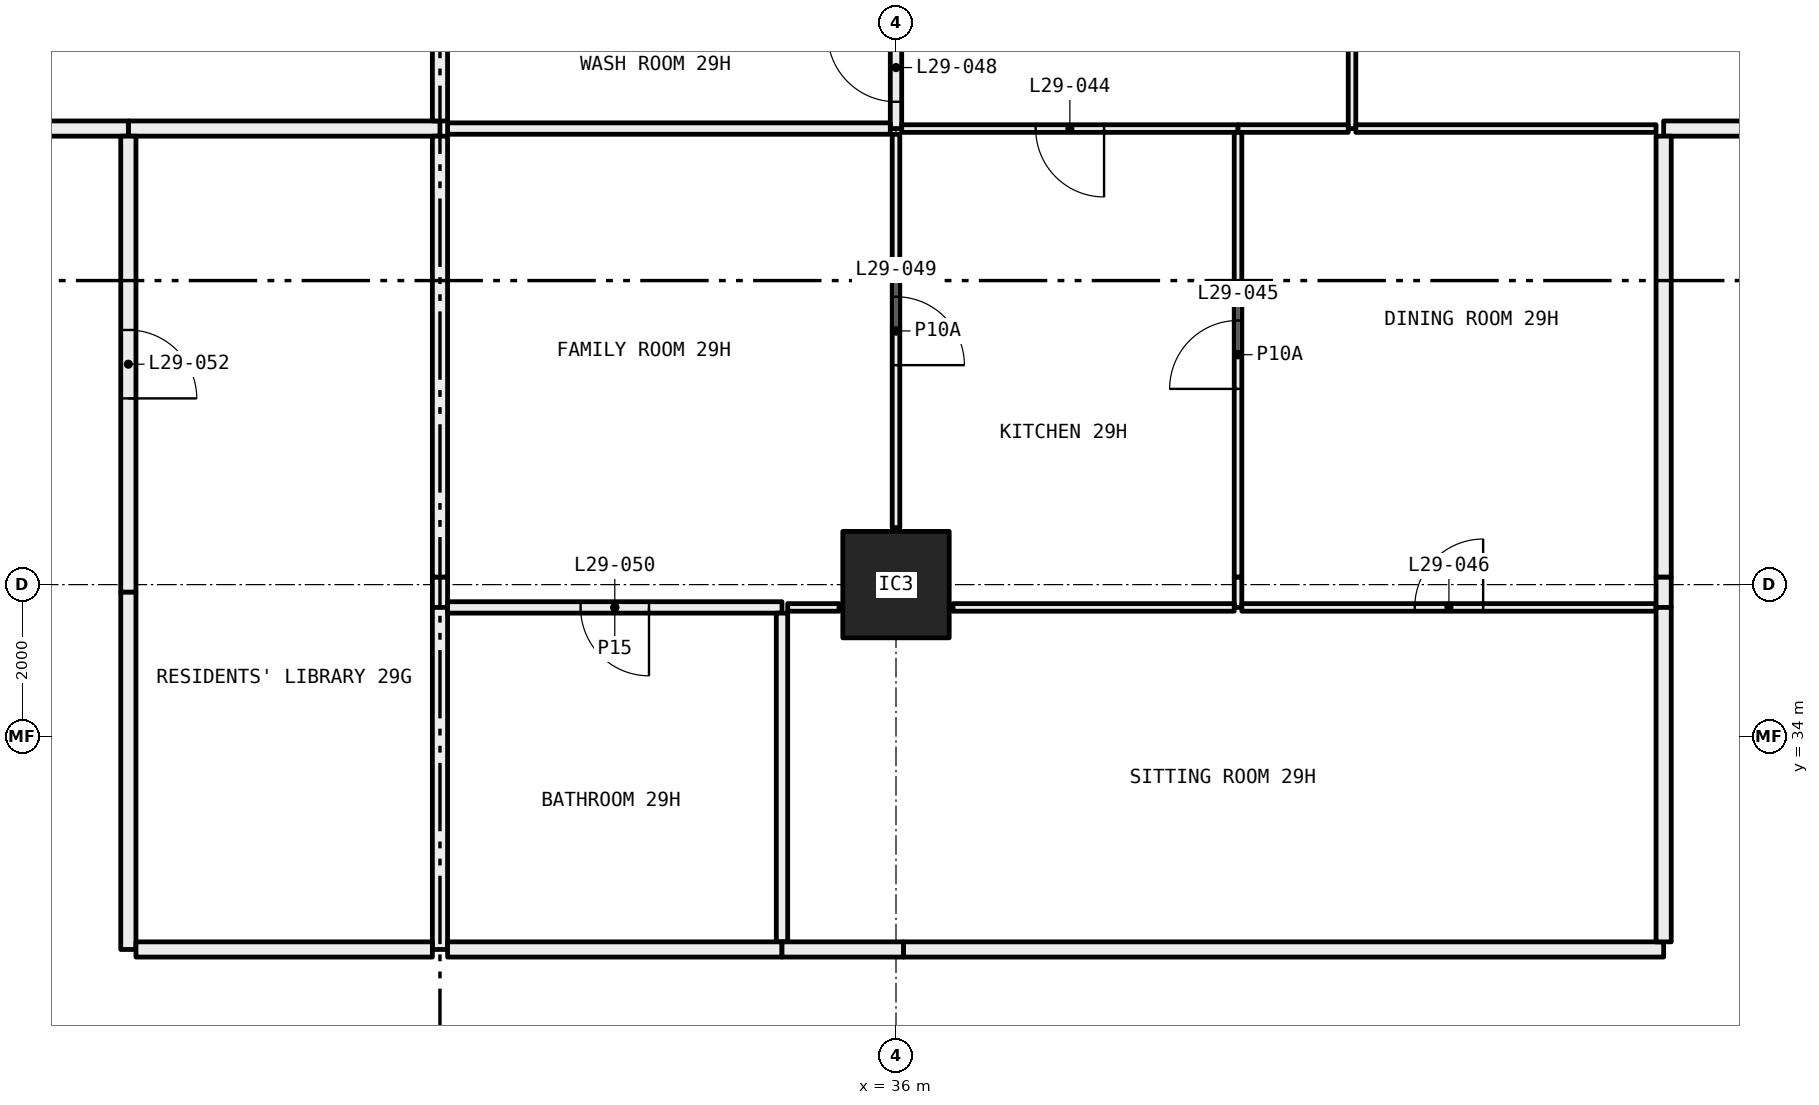
"""IFC4 building model, lengths in metres.
Left out: names, types, materials, properties, quantities, classifications, styles, units other than length and angle.
Written with IfcOpenShell. Run it as: python <this file> out.ifc"""

import sys

from ifc_helpers import new_model, si_unit, direction, frame, frame_2d, origin, origin_2d, place, context, subcontext, project, spatial, rectangle, hollow_rectangle, extrude, element, fill, save


model = new_model("IFC4")
c1 = context("Model", 3, precision=1e-05, world=origin(), true_north=direction((0.0, 1.0)))
c2 = subcontext(c1, "Body", "Model", "MODEL_VIEW")
j1 = project(units=[si_unit("LENGTHUNIT", "METRE"), si_unit("PLANEANGLEUNIT", "RADIAN")], contexts=[c1])
p1 = place(None, origin())
s1 = spatial("IfcSite", under=j1, at=p1, CompositionType="ELEMENT")
p2 = place(p1, origin())
s2 = spatial("IfcBuilding", under=s1, at=p2, CompositionType="ELEMENT")
p3 = place(p2, frame((0.0, 0.0, 113.85)))
s3 = spatial("IfcBuildingStorey", under=s2, at=p3, CompositionType="ELEMENT", Elevation=113.85)
p4 = place(p3, frame((36.0, 36.0, 0.0), z_axis=(0.0, 0.0, 1.0), x_axis=(1.0, 0.0, 0.0)))
e1 = element("IfcColumn", 1, at=p4, inside=s3, PredefinedType="COLUMN", context=c2, shape_type="SweptSolid", body=[
    extrude(hollow_rectangle(XDim=1.4, YDim=1.4, WallThickness=0.06, at=origin_2d()), origin(), (0.0, 0.0, 1.0), 3.05),
])
p5 = place(p3, frame((25.9, 42.0, 0.0), z_axis=(0.0, 0.0, 1.0), x_axis=(1.0, 0.0, 0.0)))
e2 = element("IfcWall", 2, at=p5, inside=s3, PredefinedType="PARTITIONING", context=c2, shape_type="SweptSolid", body=[
    extrude(rectangle(XDim=4.1, YDim=0.2, at=frame_2d((2.05, 0.0))), origin(), (0.0, 0.0, 1.0), 3.05),
])
p6 = place(p3, frame((30.0, 42.1, 0.0), z_axis=(0.0, 0.0, 1.0), x_axis=(0.0, 1.0, 0.0)))
e3 = element("IfcWall", 3, at=p6, inside=s3, PredefinedType="PARTITIONING", context=c2, shape_type="SweptSolid", body=[
    extrude(rectangle(XDim=1.58, YDim=0.2, at=frame_2d((0.79, 0.0))), origin(), (0.0, 0.0, 1.0), 3.05),
])
p7 = place(p3, frame((24.0, 42.0, 0.0), z_axis=(0.0, 0.0, 1.0), x_axis=(1.0, 0.0, 0.0)))
e4 = element("IfcWall", 4, at=p7, inside=s3, PredefinedType="PARTITIONING", context=c2, shape_type="SweptSolid", body=[
    extrude(rectangle(XDim=1.9, YDim=0.2, at=frame_2d((0.95, 0.0))), origin(), (0.0, 0.0, 1.0), 3.05),
])
p8 = place(p3, frame((30.0, 35.7, 0.0), z_axis=(0.0, 0.0, 1.0), x_axis=(0.0, 1.0, 0.0)))
e5 = element("IfcWall", 5, at=p8, inside=s3, PredefinedType="PARTITIONING", context=c2, shape_type="SweptSolid", body=[
    extrude(rectangle(XDim=0.4, YDim=0.2, at=frame_2d((0.2, 0.0))), origin(), (0.0, 0.0, 1.0), 2.45),
])
p9 = place(p3, frame((30.0, 36.1, 0.0), z_axis=(0.0, 0.0, 1.0), x_axis=(0.0, 1.0, 0.0)))
e6 = element("IfcWall", 6, at=p9, inside=s3, PredefinedType="PARTITIONING", context=c2, shape_type="SweptSolid", body=[
    extrude(rectangle(XDim=5.8, YDim=0.2, at=frame_2d((2.9, 0.0))), origin(), (0.0, 0.0, 1.0), 3.05),
])
p10 = place(p3, frame((30.0, 31.2, 0.0), z_axis=(0.0, 0.0, 1.0), x_axis=(0.0, 1.0, 0.0)))
e7 = element("IfcWall", 7, at=p10, inside=s3, PredefinedType="PARTITIONING", context=c2, shape_type="SweptSolid", body=[
    extrude(rectangle(XDim=4.5, YDim=0.2, at=frame_2d((2.25, 0.0))), origin(), (0.0, 0.0, 1.0), 3.05),
])
p11 = place(p3, frame((25.9, 41.9, 0.0), z_axis=(0.0, 0.0, 1.0), x_axis=(0.0, -1.0, 0.0)))
e8 = element("IfcWall", 8, at=p11, inside=s3, PredefinedType="PARTITIONING", context=c2, shape_type="SweptSolid", body=[
    extrude(rectangle(XDim=6.0, YDim=0.2, at=frame_2d((3.0, 0.0))), origin(), (0.0, 0.0, 1.0), 2.45),
])
p12 = place(p11, frame((2.55, 0.0, 0.0)))
e9 = element("IfcOpeningElement", 9, at=p12, cuts=e8, PredefinedType="OPENING", context=c2, shape_type="SweptSolid", body=[
    extrude(rectangle(XDim=0.9, YDim=2.1, at=frame_2d((0.45, 1.05))), frame((0.0, 0.11, 0.0), z_axis=(0.0, -1.0, 0.0), x_axis=(1.0, 0.0, 0.0)), (0.0, 0.0, 1.0), 0.22),
])
p13 = place(p3, frame((25.9, 35.9, 0.0), z_axis=(0.0, 0.0, 1.0), x_axis=(0.0, -1.0, 0.0)))
e10 = element("IfcWall", 10, at=p13, inside=s3, PredefinedType="PARTITIONING", context=c2, shape_type="SweptSolid", body=[
    extrude(rectangle(XDim=4.7, YDim=0.2, at=frame_2d((2.35, 0.0))), origin(), (0.0, 0.0, 1.0), 3.05),
])
p14 = place(p3, frame((26.0, 31.2, 0.0), z_axis=(0.0, 0.0, 1.0), x_axis=(1.0, 0.0, 0.0)))
e11 = element("IfcWall", 11, at=p14, inside=s3, PredefinedType="PARTITIONING", context=c2, shape_type="SweptSolid", body=[
    extrude(rectangle(XDim=3.9, YDim=0.2, at=frame_2d((1.95, 0.0))), origin(), (0.0, 0.0, 1.0), 3.05),
])
p15 = place(p3, frame((36.0, 42.0, 0.0), z_axis=(0.0, 0.0, 1.0), x_axis=(0.0, 1.0, 0.0)))
e12 = element("IfcWall", 12, at=p15, inside=s3, PredefinedType="PARTITIONING", context=c2, shape_type="SweptSolid", body=[
    extrude(rectangle(XDim=1.605, YDim=0.15, at=frame_2d((0.802, 0.0))), origin(), (0.0, 0.0, 1.0), 2.45),
])
p16 = place(p15, frame((0.353, 0.0, 0.0)))
e13 = element("IfcOpeningElement", 13, at=p16, cuts=e12, PredefinedType="OPENING", context=c2, shape_type="SweptSolid", body=[
    extrude(rectangle(XDim=0.9, YDim=2.1, at=frame_2d((0.45, 1.05))), frame((0.0, 0.085, 0.0), z_axis=(0.0, -1.0, 0.0), x_axis=(1.0, 0.0, 0.0)), (0.0, 0.0, 1.0), 0.17),
])
p17 = place(p3, frame((30.1, 42.0, 0.0), z_axis=(0.0, 0.0, 1.0), x_axis=(1.0, 0.0, 0.0)))
e14 = element("IfcWall", 14, at=p17, inside=s3, PredefinedType="PARTITIONING", context=c2, shape_type="SweptSolid", body=[
    extrude(rectangle(XDim=5.825, YDim=0.15, at=frame_2d((2.913, 0.0))), origin(), (0.0, 0.0, 1.0), 2.45),
])
p18 = place(p3, frame((42.0, 42.0, 0.0), z_axis=(0.0, 0.0, 1.0), x_axis=(0.0, 1.0, 0.0)))
e15 = element("IfcWall", 15, at=p18, inside=s3, PredefinedType="PARTITIONING", context=c2, shape_type="SweptSolid", body=[
    extrude(rectangle(XDim=5.28, YDim=0.1, at=frame_2d((2.64, 0.0))), origin(), (0.0, 0.0, 1.0), 3.05),
])
p19 = place(p18, frame((2.19, 0.0, 0.0)))
e16 = element("IfcOpeningElement", 16, at=p19, cuts=e15, PredefinedType="OPENING", context=c2, shape_type="SweptSolid", body=[
    extrude(rectangle(XDim=0.9, YDim=2.1, at=frame_2d((0.45, 1.05))), frame((0.0, 0.06, 0.0), z_axis=(0.0, -1.0, 0.0), x_axis=(1.0, 0.0, 0.0)), (0.0, 0.0, 1.0), 0.12),
])
p20 = place(p3, frame((36.075, 42.0, 0.0), z_axis=(0.0, 0.0, 1.0), x_axis=(1.0, 0.0, 0.0)))
e17 = element("IfcWall", 17, at=p20, inside=s3, PredefinedType="PARTITIONING", context=c2, shape_type="SweptSolid", body=[
    extrude(rectangle(XDim=4.425, YDim=0.1, at=frame_2d((2.212, 0.0))), origin(), (0.0, 0.0, 1.0), 2.45),
])
p21 = place(p20, frame((1.762, 0.0, 0.0)))
e18 = element("IfcOpeningElement", 18, at=p21, cuts=e17, PredefinedType="OPENING", context=c2, shape_type="SweptSolid", body=[
    extrude(rectangle(XDim=0.9, YDim=2.1, at=frame_2d((0.45, 1.05))), frame((0.0, 0.06, 0.0), z_axis=(0.0, -1.0, 0.0), x_axis=(1.0, 0.0, 0.0)), (0.0, 0.0, 1.0), 0.12),
])
p22 = place(p3, frame((40.5, 42.0, 0.0), z_axis=(0.0, 0.0, 1.0), x_axis=(1.0, 0.0, 0.0)))
e19 = element("IfcWall", 19, at=p22, inside=s3, PredefinedType="PARTITIONING", context=c2, shape_type="SweptSolid", body=[
    extrude(rectangle(XDim=1.45, YDim=0.1, at=frame_2d((0.725, 0.0))), origin(), (0.0, 0.0, 1.0), 3.05),
])
p23 = place(p3, frame((42.05, 42.0, 0.0), z_axis=(0.0, 0.0, 1.0), x_axis=(1.0, 0.0, 0.0)))
e20 = element("IfcWall", 20, at=p23, inside=s3, PredefinedType="PARTITIONING", context=c2, shape_type="SweptSolid", body=[
    extrude(rectangle(XDim=3.95, YDim=0.1, at=frame_2d((1.975, 0.0))), origin(), (0.0, 0.0, 1.0), 3.05),
])
p24 = place(p3, frame((46.1, 42.0, 0.0), z_axis=(0.0, 0.0, 1.0), x_axis=(1.0, 0.0, 0.0)))
e21 = element("IfcWall", 21, at=p24, inside=s3, PredefinedType="PARTITIONING", context=c2, shape_type="SweptSolid", body=[
    extrude(rectangle(XDim=1.9, YDim=0.2, at=frame_2d((0.95, 0.0))), origin(), (0.0, 0.0, 1.0), 3.05),
])
p25 = place(p3, frame((36.0, 36.75, 0.0), z_axis=(0.0, 0.0, 1.0), x_axis=(0.0, 1.0, 0.0)))
e22 = element("IfcWall", 22, at=p25, inside=s3, PredefinedType="PARTITIONING", context=c2, shape_type="SweptSolid", body=[
    extrude(rectangle(XDim=5.175, YDim=0.1, at=frame_2d((2.587, 0.0))), origin(), (0.0, 0.0, 1.0), 2.45),
])
p26 = place(p25, frame((2.137, 0.0, 0.0)))
e23 = element("IfcOpeningElement", 23, at=p26, cuts=e22, PredefinedType="OPENING", context=c2, shape_type="SweptSolid", body=[
    extrude(rectangle(XDim=0.9, YDim=2.1, at=frame_2d((0.45, 1.05))), frame((0.0, 0.06, 0.0), z_axis=(0.0, -1.0, 0.0), x_axis=(1.0, 0.0, 0.0)), (0.0, 0.0, 1.0), 0.12),
])
p27 = place(p3, frame((30.1, 35.7, 0.0), z_axis=(0.0, 0.0, 1.0), x_axis=(1.0, 0.0, 0.0)))
e24 = element("IfcWall", 24, at=p27, inside=s3, PredefinedType="PARTITIONING", context=c2, shape_type="SweptSolid", body=[
    extrude(rectangle(XDim=4.4, YDim=0.15, at=frame_2d((2.2, 0.0))), origin(), (0.0, 0.0, 1.0), 3.05),
])
p28 = place(p27, frame((1.75, 0.0, 0.0)))
e25 = element("IfcOpeningElement", 25, at=p28, cuts=e24, PredefinedType="OPENING", context=c2, shape_type="SweptSolid", body=[
    extrude(rectangle(XDim=0.9, YDim=2.1, at=frame_2d((0.45, 1.05))), frame((0.0, 0.085, 0.0), z_axis=(0.0, -1.0, 0.0), x_axis=(1.0, 0.0, 0.0)), (0.0, 0.0, 1.0), 0.17),
])
p29 = place(p3, frame((34.575, 35.7, 0.0), z_axis=(0.0, 0.0, 1.0), x_axis=(1.0, 0.0, 0.0)))
e26 = element("IfcWall", 26, at=p29, inside=s3, PredefinedType="PARTITIONING", context=c2, shape_type="SweptSolid", body=[
    extrude(rectangle(XDim=0.675, YDim=0.1, at=frame_2d((0.337, 0.0))), origin(), (0.0, 0.0, 1.0), 3.05),
])
p30 = place(p3, frame((40.5, 35.7, 0.0), z_axis=(0.0, 0.0, 1.0), x_axis=(0.0, 1.0, 0.0)))
e27 = element("IfcWall", 27, at=p30, inside=s3, PredefinedType="PARTITIONING", context=c2, shape_type="SweptSolid", body=[
    extrude(rectangle(XDim=0.4, YDim=0.1, at=frame_2d((0.2, 0.0))), origin(), (0.0, 0.0, 1.0), 2.45),
])
p31 = place(p3, frame((40.5, 36.1, 0.0), z_axis=(0.0, 0.0, 1.0), x_axis=(0.0, 1.0, 0.0)))
e28 = element("IfcWall", 28, at=p31, inside=s3, PredefinedType="PARTITIONING", context=c2, shape_type="SweptSolid", body=[
    extrude(rectangle(XDim=5.85, YDim=0.1, at=frame_2d((2.925, 0.0))), origin(), (0.0, 0.0, 1.0), 3.05),
])
p32 = place(p31, frame((2.475, 0.0, 0.0)))
e29 = element("IfcOpeningElement", 29, at=p32, cuts=e28, PredefinedType="OPENING", context=c2, shape_type="SweptSolid", body=[
    extrude(rectangle(XDim=0.9, YDim=2.1, at=frame_2d((0.45, 1.05))), frame((0.0, 0.06, 0.0), z_axis=(0.0, -1.0, 0.0), x_axis=(1.0, 0.0, 0.0)), (0.0, 0.0, 1.0), 0.12),
])
p33 = place(p3, frame((36.75, 35.7, 0.0), z_axis=(0.0, 0.0, 1.0), x_axis=(1.0, 0.0, 0.0)))
e30 = element("IfcWall", 30, at=p33, inside=s3, PredefinedType="PARTITIONING", context=c2, shape_type="SweptSolid", body=[
    extrude(rectangle(XDim=3.7, YDim=0.1, at=frame_2d((1.85, 0.0))), origin(), (0.0, 0.0, 1.0), 3.05),
])
p34 = place(p3, frame((40.55, 35.7, 0.0), z_axis=(0.0, 0.0, 1.0), x_axis=(1.0, 0.0, 0.0)))
e31 = element("IfcWall", 31, at=p34, inside=s3, PredefinedType="PARTITIONING", context=c2, shape_type="SweptSolid", body=[
    extrude(rectangle(XDim=5.45, YDim=0.1, at=frame_2d((2.725, 0.0))), origin(), (0.0, 0.0, 1.0), 3.05),
])
p35 = place(p34, frame((2.275, 0.0, 0.0)))
e32 = element("IfcOpeningElement", 32, at=p35, cuts=e31, PredefinedType="OPENING", context=c2, shape_type="SweptSolid", body=[
    extrude(rectangle(XDim=0.9, YDim=2.1, at=frame_2d((0.45, 1.05))), frame((0.0, 0.06, 0.0), z_axis=(0.0, -1.0, 0.0), x_axis=(1.0, 0.0, 0.0)), (0.0, 0.0, 1.0), 0.12),
])
p36 = place(p3, frame((46.1, 35.7, 0.0), z_axis=(0.0, 0.0, 1.0), x_axis=(0.0, 1.0, 0.0)))
e33 = element("IfcWall", 33, at=p36, inside=s3, PredefinedType="PARTITIONING", context=c2, shape_type="SweptSolid", body=[
    extrude(rectangle(XDim=0.4, YDim=0.2, at=frame_2d((0.2, 0.0))), origin(), (0.0, 0.0, 1.0), 2.45),
])
p37 = place(p3, frame((46.1, 36.1, 0.0), z_axis=(0.0, 0.0, 1.0), x_axis=(0.0, 1.0, 0.0)))
e34 = element("IfcWall", 34, at=p37, inside=s3, PredefinedType="PARTITIONING", context=c2, shape_type="SweptSolid", body=[
    extrude(rectangle(XDim=5.8, YDim=0.2, at=frame_2d((2.9, 0.0))), origin(), (0.0, 0.0, 1.0), 3.05),
])
p38 = place(p3, frame((34.5, 31.3, 0.0), z_axis=(0.0, 0.0, 1.0), x_axis=(0.0, 1.0, 0.0)))
e35 = element("IfcWall", 35, at=p38, inside=s3, PredefinedType="PARTITIONING", context=c2, shape_type="SweptSolid", body=[
    extrude(rectangle(XDim=4.325, YDim=0.15, at=frame_2d((2.163, 0.0))), origin(), (0.0, 0.0, 1.0), 3.05),
])
p39 = place(p3, frame((30.1, 31.2, 0.0), z_axis=(0.0, 0.0, 1.0), x_axis=(1.0, 0.0, 0.0)))
e36 = element("IfcWall", 36, at=p39, inside=s3, PredefinedType="PARTITIONING", context=c2, shape_type="SweptSolid", body=[
    extrude(rectangle(XDim=4.4, YDim=0.2, at=frame_2d((2.2, 0.0))), origin(), (0.0, 0.0, 1.0), 3.05),
])
p40 = place(p3, frame((34.5, 31.2, 0.0), z_axis=(0.0, 0.0, 1.0), x_axis=(1.0, 0.0, 0.0)))
e37 = element("IfcWall", 37, at=p40, inside=s3, PredefinedType="PARTITIONING", context=c2, shape_type="SweptSolid", body=[
    extrude(rectangle(XDim=1.6, YDim=0.2, at=frame_2d((0.8, 0.0))), origin(), (0.0, 0.0, 1.0), 2.45),
])
p41 = place(p3, frame((36.1, 31.2, 0.0), z_axis=(0.0, 0.0, 1.0), x_axis=(1.0, 0.0, 0.0)))
e38 = element("IfcWall", 38, at=p41, inside=s3, PredefinedType="PARTITIONING", context=c2, shape_type="SweptSolid", body=[
    extrude(rectangle(XDim=10.0, YDim=0.2, at=frame_2d((5.0, 0.0))), origin(), (0.0, 0.0, 1.0), 3.05),
])
p42 = place(p3, frame((46.1, 31.3, 0.0), z_axis=(0.0, 0.0, 1.0), x_axis=(0.0, 1.0, 0.0)))
e39 = element("IfcWall", 39, at=p42, inside=s3, PredefinedType="PARTITIONING", context=c2, shape_type="SweptSolid", body=[
    extrude(rectangle(XDim=4.4, YDim=0.2, at=frame_2d((2.2, 0.0))), origin(), (0.0, 0.0, 1.0), 3.05),
])
p43 = place(p21, frame((0.9, 0.0, 0.0), x_axis=(-1.0, 0.0, 0.0)))
e40 = element("IfcDoor", 40, at=p43, inside=s3, OperationType="SINGLE_SWING_RIGHT", PredefinedType="DOOR", context=c2, shape_type="SweptSolid", body=[
    extrude(rectangle(XDim=0.9, YDim=2.1, at=frame_2d((0.45, 1.05))), frame((0.0, 0.025, 0.0), z_axis=(0.0, -1.0, 0.0), x_axis=(1.0, 0.0, 0.0)), (0.0, 0.0, 1.0), 0.05),
])
fill(e18, e40)
p44 = place(p32, origin())
e41 = element("IfcDoor", 41, at=p44, inside=s3, OperationType="SINGLE_SWING_RIGHT", PredefinedType="DOOR", context=c2, shape_type="SweptSolid", body=[
    extrude(rectangle(XDim=0.9, YDim=2.1, at=frame_2d((0.45, 1.05))), frame((0.0, 0.025, 0.0), z_axis=(0.0, -1.0, 0.0), x_axis=(1.0, 0.0, 0.0)), (0.0, 0.0, 1.0), 0.05),
])
fill(e29, e41)
p45 = place(p35, origin())
e42 = element("IfcDoor", 42, at=p45, inside=s3, OperationType="SINGLE_SWING_LEFT", PredefinedType="DOOR", context=c2, shape_type="SweptSolid", body=[
    extrude(rectangle(XDim=0.9, YDim=2.1, at=frame_2d((0.45, 1.05))), frame((0.0, 0.025, 0.0), z_axis=(0.0, -1.0, 0.0), x_axis=(1.0, 0.0, 0.0)), (0.0, 0.0, 1.0), 0.05),
])
fill(e32, e42)
p46 = place(p16, origin())
e43 = element("IfcDoor", 43, at=p46, inside=s3, OperationType="SINGLE_SWING_LEFT", PredefinedType="DOOR", context=c2, shape_type="SweptSolid", body=[
    extrude(rectangle(XDim=0.9, YDim=2.1, at=frame_2d((0.45, 1.05))), frame((0.0, 0.025, 0.0), z_axis=(0.0, -1.0, 0.0), x_axis=(1.0, 0.0, 0.0)), (0.0, 0.0, 1.0), 0.05),
])
fill(e13, e43)
p47 = place(p26, frame((0.9, 0.0, 0.0), x_axis=(-1.0, 0.0, 0.0)))
e44 = element("IfcDoor", 44, at=p47, inside=s3, OperationType="SINGLE_SWING_LEFT", PredefinedType="DOOR", context=c2, shape_type="SweptSolid", body=[
    extrude(rectangle(XDim=0.9, YDim=2.1, at=frame_2d((0.45, 1.05))), frame((0.0, 0.025, 0.0), z_axis=(0.0, -1.0, 0.0), x_axis=(1.0, 0.0, 0.0)), (0.0, 0.0, 1.0), 0.05),
])
fill(e23, e44)
p48 = place(p28, frame((0.9, 0.0, 0.0), x_axis=(-1.0, 0.0, 0.0)))
e45 = element("IfcDoor", 45, at=p48, inside=s3, OperationType="SINGLE_SWING_RIGHT", PredefinedType="DOOR", context=c2, shape_type="SweptSolid", body=[
    extrude(rectangle(XDim=0.9, YDim=2.1, at=frame_2d((0.45, 1.05))), frame((0.0, 0.025, 0.0), z_axis=(0.0, -1.0, 0.0), x_axis=(1.0, 0.0, 0.0)), (0.0, 0.0, 1.0), 0.05),
])
fill(e25, e45)
p49 = place(p12, origin())
e46 = element("IfcDoor", 46, at=p49, inside=s3, OperationType="SINGLE_SWING_LEFT", PredefinedType="DOOR", context=c2, shape_type="SweptSolid", body=[
    extrude(rectangle(XDim=0.9, YDim=2.1, at=frame_2d((0.45, 1.05))), frame((0.0, 0.025, 0.0), z_axis=(0.0, -1.0, 0.0), x_axis=(1.0, 0.0, 0.0)), (0.0, 0.0, 1.0), 0.05),
])
fill(e9, e46)
save(model, sys.argv[1])
